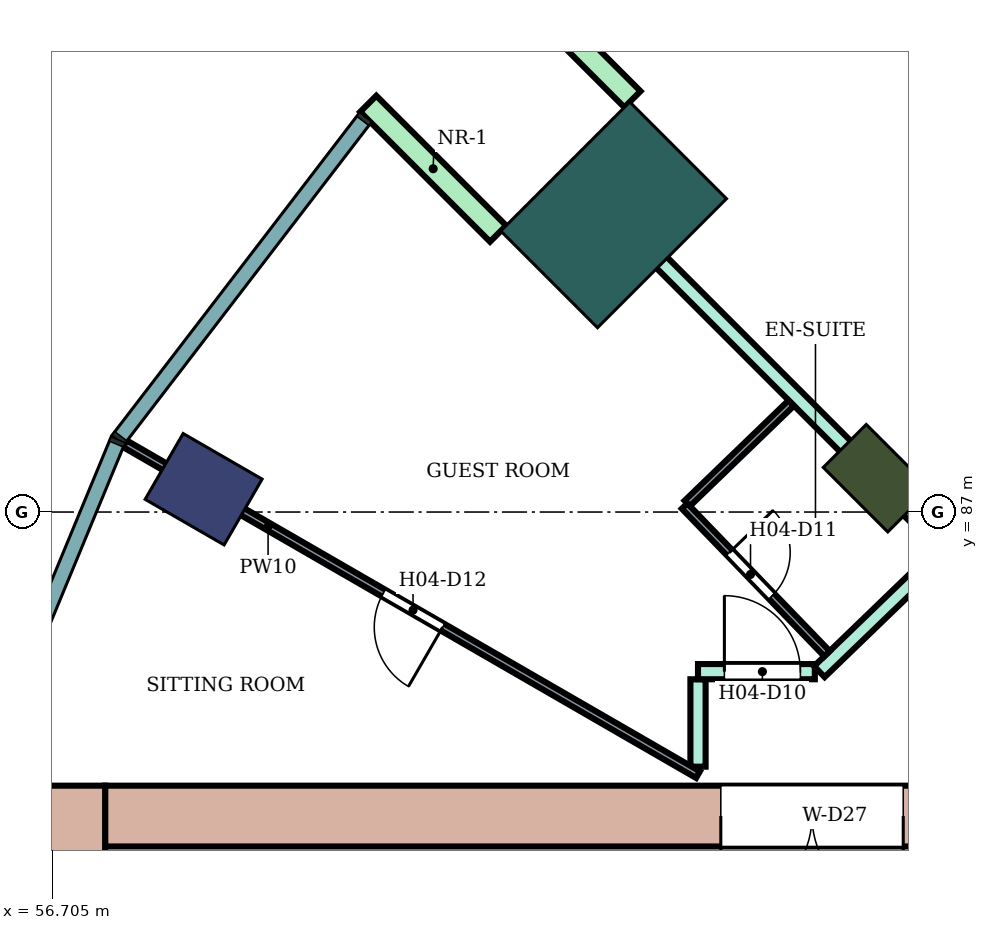
"""IFC4 building model, lengths in metres.
Left out: names, types, materials, properties, quantities, classifications, styles, units other than length and angle.
Written with IfcOpenShell. Run it as: python <this file> out.ifc"""

import sys

from ifc_helpers import new_model, si_unit, direction, frame, frame_2d, origin, origin_2d, place, context, subcontext, project, spatial, rectangle, extrude, element, fill, save


model = new_model("IFC4")
c1 = context("Model", 3, precision=1e-05, world=origin(), true_north=direction((0.0, 1.0)))
c2 = subcontext(c1, "Body", "Model", "MODEL_VIEW")
j1 = project(units=[si_unit("LENGTHUNIT", "METRE"), si_unit("PLANEANGLEUNIT", "RADIAN")], contexts=[c1])
p1 = place(None, origin())
s1 = spatial("IfcSite", under=j1, at=p1, CompositionType="ELEMENT")
p2 = place(p1, origin())
s2 = spatial("IfcBuilding", under=s1, at=p2, CompositionType="ELEMENT")
p3 = place(p2, frame((0.0, 0.0, 70.6)))
s3 = spatial("IfcBuildingStorey", under=s2, at=p3, CompositionType="ELEMENT", Elevation=70.6)
p4 = place(p3, frame((58.696, 87.3, 0.0), z_axis=(0.0, 0.0, 1.0), x_axis=(-0.866025403784, 0.5, 0.0)))
e1 = element("IfcColumn", 1, at=p4, inside=s3, PredefinedType="COLUMN", context=c2, shape_type="SweptSolid", body=[
    extrude(rectangle(XDim=1.2, YDim=1.0, at=origin_2d()), origin(), (0.0, 0.0, 1.0), 3.8),
])
p5 = place(p3, frame((67.555, 87.445, 0.0), z_axis=(0.0, 0.0, 1.0), x_axis=(-0.707106781187, 0.707106781187, 0.0)))
e2 = element("IfcColumn", 2, at=p5, inside=s3, PredefinedType="COLUMN", context=c2, shape_type="SweptSolid", body=[
    extrude(rectangle(XDim=1.2, YDim=0.8, at=origin_2d()), origin(), (0.0, 0.0, 1.0), 3.8),
])
p6 = place(p3, frame((64.09, 90.91, 0.0), z_axis=(0.0, 0.0, 1.0), x_axis=(-0.707106781187, 0.707106781187, 0.0)))
e3 = element("IfcColumn", 3, at=p6, inside=s3, PredefinedType="COLUMN", context=c2, shape_type="SweptSolid", body=[
    extrude(rectangle(XDim=1.8, YDim=2.4, at=origin_2d()), origin(), (0.0, 0.0, 1.0), 3.8),
])
p7 = place(p3, frame((72.1, 83.0, 0.0), z_axis=(0.0, 0.0, 1.0), x_axis=(-1.0, 0.0, 0.0)))
e4 = element("IfcWall", 4, at=p7, inside=s3, PredefinedType="SHEAR", context=c2, shape_type="SweptSolid", body=[
    extrude(rectangle(XDim=14.7, YDim=0.8, at=frame_2d((7.35, 0.0))), origin(), (0.0, 0.0, 1.0), 3.4),
])
p8 = place(p7, frame((4.2, 0.0, 0.0)))
e5 = element("IfcOpeningElement", 5, at=p8, cuts=e4, PredefinedType="OPENING", context=c2, shape_type="SweptSolid", body=[
    extrude(rectangle(XDim=2.4, YDim=2.4, at=frame_2d((1.2, 1.2))), frame((0.0, 0.41, 0.0), z_axis=(0.0, -1.0, 0.0), x_axis=(1.0, 0.0, 0.0)), (0.0, 0.0, 1.0), 0.82),
])
p9 = place(p3, frame((57.0, 83.4, 0.0), z_axis=(0.0, 0.0, 1.0), x_axis=(0.0, -1.0, 0.0)))
e6 = element("IfcWall", 6, at=p9, inside=s3, PredefinedType="SHEAR", context=c2, shape_type="SweptSolid", body=[
    extrude(rectangle(XDim=16.8, YDim=0.8, at=frame_2d((8.4, 0.0))), origin(), (0.0, 0.0, 1.0), 3.4),
])
for number, where, z_axis, x_axis in (
    (7, (64.338, 92.43, 0.0), (0.0, 0.0, 1.0), (-0.707, 0.707, 0.0)),
    (8, (62.57, 90.662, 0.0), (0.0, 0.0, 1.0), (-0.707, 0.707, 0.0)),
):
    element("IfcWall", number, at=place(p3, frame(where, z_axis=z_axis, x_axis=x_axis)), inside=s3, PredefinedType="NOTDEFINED", context=c2, shape_type="SweptSolid", body=[
        extrude(rectangle(XDim=2.416, YDim=0.3, at=frame_2d((1.208, 0.0))), origin(), (0.0, 0.0, 1.0), 3.8),
    ])
p10 = place(p3, frame((63.598, 91.407, 0.0), z_axis=(0.0, 0.0, 1.0), x_axis=(0.706981202484, -0.707232337591, 0.0)))
e9 = element("IfcWall", 9, at=p10, inside=s3, PredefinedType="PARTITIONING", context=c2, shape_type="SweptSolid", body=[
    extrude(rectangle(XDim=6.805, YDim=0.2, at=frame_2d((3.402, 0.0))), origin(), (0.0, 0.0, 1.0), 3.35),
])
p11 = place(p3, frame((65.2, 83.65, 0.0), z_axis=(0.0, 0.0, 1.0), x_axis=(0.0, 1.0, 0.0)))
e10 = element("IfcWall", 10, at=p11, inside=s3, PredefinedType="PARTITIONING", context=c2, shape_type="SweptSolid", body=[
    extrude(rectangle(XDim=1.15, YDim=0.2, at=frame_2d((0.575, 0.0))), origin(), (0.0, 0.0, 1.0), 3.35),
])
p12 = place(p3, frame((65.2, 84.9, 0.0), z_axis=(0.0, 0.0, 1.0), x_axis=(1.0, 0.0, 0.0)))
e11 = element("IfcWall", 11, at=p12, inside=s3, PredefinedType="PARTITIONING", context=c2, shape_type="SweptSolid", body=[
    extrude(rectangle(XDim=1.537, YDim=0.2, at=frame_2d((0.769, 0.0))), origin(), (0.0, 0.0, 1.0), 3.35),
])
p13 = place(p12, frame((0.347, 0.0, 0.0)))
e12 = element("IfcOpeningElement", 12, at=p13, cuts=e11, PredefinedType="OPENING", context=c2, shape_type="SweptSolid", body=[
    extrude(rectangle(XDim=1.0, YDim=2.1, at=frame_2d((0.5, 1.05))), frame((0.0, 0.11, 0.0), z_axis=(0.0, -1.0, 0.0), x_axis=(1.0, 0.0, 0.0)), (0.0, 0.0, 1.0), 0.22),
])
p14 = place(p3, frame((66.797, 84.9, 0.0), z_axis=(0.0, 0.0, 1.0), x_axis=(0.719692092412, 0.694293376116, 0.0)))
e13 = element("IfcWall", 13, at=p14, inside=s3, PredefinedType="PARTITIONING", context=c2, shape_type="SweptSolid", body=[
    extrude(rectangle(XDim=6.584, YDim=0.2, at=frame_2d((3.292, 0.0))), origin(), (0.0, 0.0, 1.0), 3.35),
])
p15 = place(p14, frame((2.866, 0.0, 0.0)))
e14 = element("IfcOpeningElement", 14, at=p15, cuts=e13, PredefinedType="OPENING", context=c2, shape_type="SweptSolid", body=[
    extrude(rectangle(XDim=1.0, YDim=2.1, at=frame_2d((0.5, 1.05))), frame((0.0, 0.11, 0.0), z_axis=(0.0, -1.0, 0.0), x_axis=(1.0, 0.0, 0.0)), (0.0, 0.0, 1.0), 0.22),
])
p16 = place(p3, frame((67.101, 97.342, 0.0), z_axis=(0.0, 0.0, 1.0), x_axis=(0.499932813297, -0.866064190571, 0.0)))
e15 = element("IfcWall", 15, at=p16, inside=s3, PredefinedType="PARTITIONING", context=c2, shape_type="SweptSolid", body=[
    extrude(rectangle(XDim=8.908, YDim=0.2, at=frame_2d((4.454, 0.0))), origin(), (0.0, 0.0, 1.0), 3.35),
])
p17 = place(p3, frame((57.659, 87.899, 0.0), z_axis=(0.0, 0.0, 1.0), x_axis=(0.86602264145, -0.500004784474, 0.0)))
e16 = element("IfcWall", 16, at=p17, inside=s3, PredefinedType="PARTITIONING", context=c2, shape_type="SweptSolid", body=[
    extrude(rectangle(XDim=8.708, YDim=0.1, at=frame_2d((4.354, 0.0))), origin(), (0.0, 0.0, 1.0), 3.35),
])
p18 = place(p17, frame((3.929, 0.0, 0.0)))
e17 = element("IfcOpeningElement", 17, at=p18, cuts=e16, PredefinedType="OPENING", context=c2, shape_type="SweptSolid", body=[
    extrude(rectangle(XDim=0.9, YDim=2.1, at=frame_2d((0.45, 1.05))), frame((0.0, 0.06, 0.0), z_axis=(0.0, -1.0, 0.0), x_axis=(1.0, 0.0, 0.0)), (0.0, 0.0, 1.0), 0.12),
])
p19 = place(p3, frame((65.059, 87.114, 0.0), z_axis=(0.0, 0.0, 1.0), x_axis=(0.719715847356, 0.694268751324, 0.0)))
e18 = element("IfcWall", 18, at=p19, inside=s3, PredefinedType="PARTITIONING", context=c2, shape_type="SweptSolid", body=[
    extrude(rectangle(XDim=1.9, YDim=0.1, at=frame_2d((0.95, 0.0))), origin(), (0.0, 0.0, 1.0), 3.35),
])
p20 = place(p3, frame((65.023, 87.079, 0.0), z_axis=(0.0, 0.0, 1.0), x_axis=(0.694287838235, -0.719697434815, 0.0)))
e19 = element("IfcWall", 19, at=p20, inside=s3, PredefinedType="PARTITIONING", context=c2, shape_type="SweptSolid", body=[
    extrude(rectangle(XDim=2.7, YDim=0.1, at=frame_2d((1.35, 0.0))), origin(), (0.0, 0.0, 1.0), 3.35),
])
p21 = place(p20, frame((0.85, 0.0, 0.0)))
e20 = element("IfcOpeningElement", 20, at=p21, cuts=e19, PredefinedType="OPENING", context=c2, shape_type="SweptSolid", body=[
    extrude(rectangle(XDim=0.8, YDim=2.1, at=frame_2d((0.4, 1.05))), frame((0.0, 0.06, 0.0), z_axis=(0.0, -1.0, 0.0), x_axis=(1.0, 0.0, 0.0)), (0.0, 0.0, 1.0), 0.12),
])
p22 = place(p13, origin())
e21 = element("IfcDoor", 21, at=p22, inside=s3, OperationType="SINGLE_SWING_LEFT", PredefinedType="DOOR", context=c2, shape_type="SweptSolid", body=[
    extrude(rectangle(XDim=1.0, YDim=2.1, at=frame_2d((0.5, 1.05))), frame((0.0, 0.025, 0.0), z_axis=(0.0, -1.0, 0.0), x_axis=(1.0, 0.0, 0.0)), (0.0, 0.0, 1.0), 0.05),
])
fill(e12, e21)
p23 = place(p21, origin())
e22 = element("IfcDoor", 22, at=p23, inside=s3, OperationType="SINGLE_SWING_LEFT", PredefinedType="DOOR", context=c2, shape_type="SweptSolid", body=[
    extrude(rectangle(XDim=0.8, YDim=2.1, at=frame_2d((0.4, 1.05))), frame((0.0, 0.025, 0.0), z_axis=(0.0, -1.0, 0.0), x_axis=(1.0, 0.0, 0.0)), (0.0, 0.0, 1.0), 0.05),
])
fill(e20, e22)
p24 = place(p18, frame((0.9, 0.0, 0.0), z_axis=(0.0, 0.0, 1.0), x_axis=(-1.0, 0.0, 0.0)))
e23 = element("IfcDoor", 23, at=p24, inside=s3, OperationType="SINGLE_SWING_LEFT", PredefinedType="DOOR", context=c2, shape_type="SweptSolid", body=[
    extrude(rectangle(XDim=0.9, YDim=2.1, at=frame_2d((0.45, 1.05))), frame((0.0, 0.025, 0.0), z_axis=(0.0, -1.0, 0.0), x_axis=(1.0, 0.0, 0.0)), (0.0, 0.0, 1.0), 0.05),
])
fill(e17, e23)
p25 = place(p8, origin())
e24 = element("IfcDoor", 24, at=p25, inside=s3, OperationType="DOUBLE_DOOR_SINGLE_SWING", PredefinedType="DOOR", context=c2, shape_type="SweptSolid", body=[
    extrude(rectangle(XDim=2.4, YDim=2.4, at=frame_2d((1.2, 1.2))), frame((0.0, 0.025, 0.0), z_axis=(0.0, -1.0, 0.0), x_axis=(1.0, 0.0, 0.0)), (0.0, 0.0, 1.0), 0.05),
])
fill(e5, e24)
save(model, sys.argv[1])
